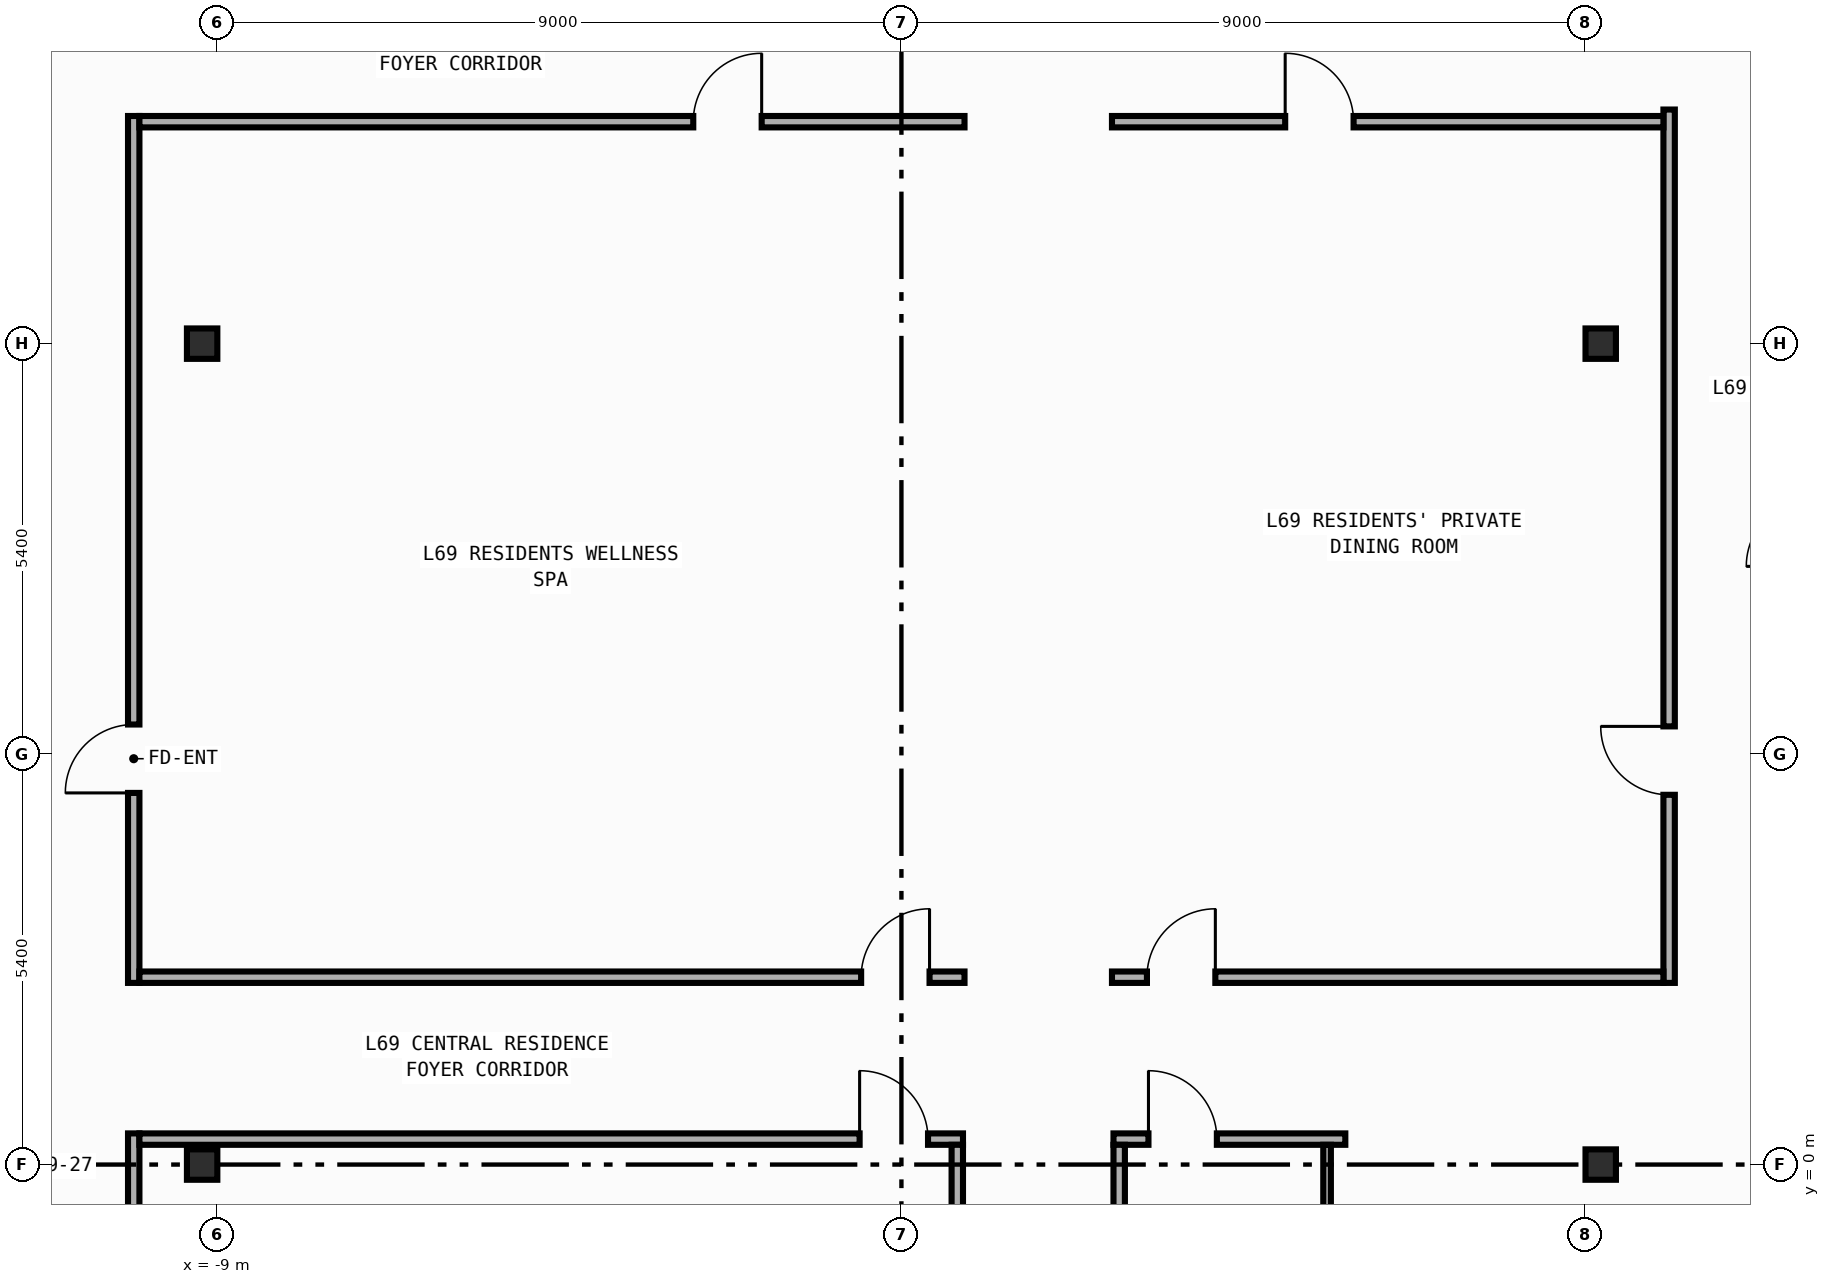
"""IFC4 building model, lengths in metres.
Left out: names, types, materials, properties, quantities, classifications, styles, units other than length and angle.
Written with IfcOpenShell. Run it as: python <this file> out.ifc"""

import sys

from ifc_helpers import new_model, si_unit, direction, frame, frame_2d, origin, origin_2d, place, context, subcontext, project, spatial, rectangle, i_section, extrude, element, fill, save


model = new_model("IFC4")
c1 = context("Model", 3, precision=1e-05, world=origin(), true_north=direction((0.0, 1.0)))
c2 = subcontext(c1, "Body", "Model", "MODEL_VIEW")
j1 = project(units=[si_unit("LENGTHUNIT", "METRE"), si_unit("PLANEANGLEUNIT", "RADIAN")], contexts=[c1])
p1 = place(None, origin())
s1 = spatial("IfcSite", under=j1, at=p1, CompositionType="ELEMENT")
p2 = place(p1, origin())
s2 = spatial("IfcBuilding", under=s1, at=p2, CompositionType="ELEMENT")
p3 = place(p2, frame((0.0, 0.0, 289.0)))
s3 = spatial("IfcBuildingStorey", under=s2, at=p3, CompositionType="ELEMENT", Elevation=289.0)
for number, where, z_axis, x_axis in (
    (1, (-9.2, 0.0, 0.0), (0.0, 0.0, 1.0), (1.0, 0.0, 0.0)),
    (2, (-9.2, 10.8, 0.0), (0.0, 0.0, 1.0), (1.0, 0.0, 0.0)),
    (3, (9.2, 0.0, 0.0), (0.0, 0.0, 1.0), (1.0, 0.0, 0.0)),
    (4, (9.2, 10.8, 0.0), (0.0, 0.0, 1.0), (1.0, 0.0, 0.0)),
):
    element("IfcColumn", number, at=place(p3, frame(where, z_axis=z_axis, x_axis=x_axis)), inside=s3, PredefinedType="COLUMN", context=c2, shape_type="SweptSolid", body=[
        extrude(i_section(OverallWidth=0.4, OverallDepth=0.4, WebThickness=0.013, FlangeThickness=0.021, FilletRadius=0.022, at=origin_2d()), origin(), (0.0, 0.0, 1.0), 3.8),
    ])
p4 = place(p3, frame((-10.1, 2.39, 0.0), z_axis=(0.0, 0.0, 1.0), x_axis=(0.0, 1.0, 0.0)))
e5 = element("IfcWall", 5, at=p4, inside=s3, PredefinedType="PARTITIONING", context=c2, shape_type="SweptSolid", body=[
    extrude(rectangle(XDim=11.405, YDim=0.15, at=frame_2d((5.703, 0.0))), origin(), (0.0, 0.0, 1.0), 3.54),
])
p5 = place(p4, frame((2.5, 0.0, 0.0)))
e6 = element("IfcOpeningElement", 6, at=p5, cuts=e5, PredefinedType="OPENING", context=c2, shape_type="SweptSolid", body=[
    extrude(rectangle(XDim=0.9, YDim=2.15, at=frame_2d((0.45, 1.075))), frame((0.0, 0.085, 0.0), z_axis=(0.0, -1.0, 0.0), x_axis=(1.0, 0.0, 0.0)), (0.0, 0.0, 1.0), 0.17),
])
p6 = place(p3, frame((-10.1, -13.795, 0.0), z_axis=(0.0, 0.0, 1.0), x_axis=(0.0, 1.0, 0.0)))
e7 = element("IfcWall", 7, at=p6, inside=s3, PredefinedType="PARTITIONING", context=c2, shape_type="SweptSolid", body=[
    extrude(rectangle(XDim=14.205, YDim=0.15, at=frame_2d((7.103, 0.0))), origin(), (0.0, 0.0, 1.0), 3.54),
])
p7 = place(p6, frame((7.972, 0.0, 0.0)))
e8 = element("IfcOpeningElement", 8, at=p7, cuts=e7, PredefinedType="OPENING", context=c2, shape_type="SweptSolid", body=[
    extrude(rectangle(XDim=0.9, YDim=2.15, at=frame_2d((0.45, 1.075))), frame((0.0, 0.085, 0.0), z_axis=(0.0, -1.0, 0.0), x_axis=(1.0, 0.0, 0.0)), (0.0, 0.0, 1.0), 0.17),
])
p8 = place(p3, frame((10.1, 2.39, 0.0), z_axis=(0.0, 0.0, 1.0), x_axis=(0.0, 1.0, 0.0)))
e9 = element("IfcWall", 9, at=p8, inside=s3, PredefinedType="PARTITIONING", context=c2, shape_type="SweptSolid", body=[
    extrude(rectangle(XDim=11.49, YDim=0.15, at=frame_2d((5.745, 0.0))), origin(), (0.0, 0.0, 1.0), 3.54),
])
p9 = place(p8, frame((2.475, 0.0, 0.0)))
e10 = element("IfcOpeningElement", 10, at=p9, cuts=e9, PredefinedType="OPENING", context=c2, shape_type="SweptSolid", body=[
    extrude(rectangle(XDim=0.9, YDim=2.15, at=frame_2d((0.45, 1.075))), frame((0.0, 0.085, 0.0), z_axis=(0.0, -1.0, 0.0), x_axis=(1.0, 0.0, 0.0)), (0.0, 0.0, 1.0), 0.17),
])
p10 = place(p3, frame((-10.025, 2.465, 0.0), z_axis=(0.0, 0.0, 1.0), x_axis=(1.0, 0.0, 0.0)))
e11 = element("IfcWall", 11, at=p10, inside=s3, PredefinedType="PARTITIONING", context=c2, shape_type="SweptSolid", body=[
    extrude(rectangle(XDim=10.855, YDim=0.15, at=frame_2d((5.427, 0.0))), origin(), (0.0, 0.0, 1.0), 3.54),
])
p11 = place(p10, frame((9.495, 0.0, 0.0)))
e12 = element("IfcOpeningElement", 12, at=p11, cuts=e11, PredefinedType="OPENING", context=c2, shape_type="SweptSolid", body=[
    extrude(rectangle(XDim=0.9, YDim=2.15, at=frame_2d((0.45, 1.075))), frame((0.0, 0.085, 0.0), z_axis=(0.0, -1.0, 0.0), x_axis=(1.0, 0.0, 0.0)), (0.0, 0.0, 1.0), 0.17),
])
p12 = place(p3, frame((-10.025, 0.335, 0.0), z_axis=(0.0, 0.0, 1.0), x_axis=(1.0, 0.0, 0.0)))
e13 = element("IfcWall", 13, at=p12, inside=s3, PredefinedType="PARTITIONING", context=c2, shape_type="SweptSolid", body=[
    extrude(rectangle(XDim=10.835, YDim=0.15, at=frame_2d((5.417, 0.0))), origin(), (0.0, 0.0, 1.0), 2.64),
])
p13 = place(p12, frame((9.475, 0.0, 0.0)))
e14 = element("IfcOpeningElement", 14, at=p13, cuts=e13, PredefinedType="OPENING", context=c2, shape_type="SweptSolid", body=[
    extrude(rectangle(XDim=0.9, YDim=2.15, at=frame_2d((0.45, 1.075))), frame((0.0, 0.085, 0.0), z_axis=(0.0, -1.0, 0.0), x_axis=(1.0, 0.0, 0.0)), (0.0, 0.0, 1.0), 0.17),
])
p14 = place(p3, frame((2.77, 2.465, 0.0), z_axis=(0.0, 0.0, 1.0), x_axis=(1.0, 0.0, 0.0)))
e15 = element("IfcWall", 15, at=p14, inside=s3, PredefinedType="PARTITIONING", context=c2, shape_type="SweptSolid", body=[
    extrude(rectangle(XDim=7.255, YDim=0.15, at=frame_2d((3.627, 0.0))), origin(), (0.0, 0.0, 1.0), 3.54),
])
p15 = place(p14, frame((0.46, 0.0, 0.0)))
e16 = element("IfcOpeningElement", 16, at=p15, cuts=e15, PredefinedType="OPENING", context=c2, shape_type="SweptSolid", body=[
    extrude(rectangle(XDim=0.9, YDim=2.15, at=frame_2d((0.45, 1.075))), frame((0.0, 0.085, 0.0), z_axis=(0.0, -1.0, 0.0), x_axis=(1.0, 0.0, 0.0)), (0.0, 0.0, 1.0), 0.17),
])
p16 = place(p3, frame((2.79, 0.335, 0.0), z_axis=(0.0, 0.0, 1.0), x_axis=(1.0, 0.0, 0.0)))
e17 = element("IfcWall", 17, at=p16, inside=s3, PredefinedType="PARTITIONING", context=c2, shape_type="SweptSolid", body=[
    extrude(rectangle(XDim=3.05, YDim=0.15, at=frame_2d((1.525, 0.0))), origin(), (0.0, 0.0, 1.0), 2.64),
])
p17 = place(p16, frame((0.46, 0.0, 0.0)))
e18 = element("IfcOpeningElement", 18, at=p17, cuts=e17, PredefinedType="OPENING", context=c2, shape_type="SweptSolid", body=[
    extrude(rectangle(XDim=0.9, YDim=2.15, at=frame_2d((0.45, 1.075))), frame((0.0, 0.085, 0.0), z_axis=(0.0, -1.0, 0.0), x_axis=(1.0, 0.0, 0.0)), (0.0, 0.0, 1.0), 0.17),
])
p18 = place(p3, frame((0.735, -13.795, 0.0), z_axis=(0.0, 0.0, 1.0), x_axis=(0.0, 1.0, 0.0)))
e19 = element("IfcWall", 19, at=p18, inside=s3, PredefinedType="PARTITIONING", context=c2, shape_type="SweptSolid", body=[
    extrude(rectangle(XDim=14.055, YDim=0.15, at=frame_2d((7.027, 0.0))), origin(), (0.0, 0.0, 1.0), 3.54),
])
p19 = place(p18, frame((7.881, 0.0, 0.0)))
e20 = element("IfcOpeningElement", 20, at=p19, cuts=e19, PredefinedType="OPENING", context=c2, shape_type="SweptSolid", body=[
    extrude(rectangle(XDim=0.9, YDim=2.15, at=frame_2d((0.45, 1.075))), frame((0.0, 0.085, 0.0), z_axis=(0.0, -1.0, 0.0), x_axis=(1.0, 0.0, 0.0)), (0.0, 0.0, 1.0), 0.17),
])
p20 = place(p3, frame((2.865, -2.38, 0.0), z_axis=(0.0, 0.0, 1.0), x_axis=(0.0, 1.0, 0.0)))
e21 = element("IfcWall", 21, at=p20, inside=s3, PredefinedType="PARTITIONING", context=c2, shape_type="SweptSolid", body=[
    extrude(rectangle(XDim=2.64, YDim=0.15, at=frame_2d((1.32, 0.0))), origin(), (0.0, 0.0, 1.0), 3.54),
])
p21 = place(p20, frame((0.46, 0.0, 0.0)))
e22 = element("IfcOpeningElement", 22, at=p21, cuts=e21, PredefinedType="OPENING", context=c2, shape_type="SweptSolid", body=[
    extrude(rectangle(XDim=0.9, YDim=2.15, at=frame_2d((0.45, 1.075))), frame((0.0, 0.085, 0.0), z_axis=(0.0, -1.0, 0.0), x_axis=(1.0, 0.0, 0.0)), (0.0, 0.0, 1.0), 0.17),
])
p22 = place(p3, frame((-10.025, 13.72, 0.0), z_axis=(0.0, 0.0, 1.0), x_axis=(1.0, 0.0, 0.0)))
e23 = element("IfcWall", 23, at=p22, inside=s3, PredefinedType="PARTITIONING", context=c2, shape_type="SweptSolid", body=[
    extrude(rectangle(XDim=10.855, YDim=0.15, at=frame_2d((5.427, 0.0))), origin(), (0.0, 0.0, 1.0), 3.54),
])
p23 = place(p22, frame((7.286, 0.0, 0.0)))
e24 = element("IfcOpeningElement", 24, at=p23, cuts=e23, PredefinedType="OPENING", context=c2, shape_type="SweptSolid", body=[
    extrude(rectangle(XDim=0.9, YDim=2.15, at=frame_2d((0.45, 1.075))), frame((0.0, 0.085, 0.0), z_axis=(0.0, -1.0, 0.0), x_axis=(1.0, 0.0, 0.0)), (0.0, 0.0, 1.0), 0.17),
])
p24 = place(p3, frame((2.77, 13.72, 0.0), z_axis=(0.0, 0.0, 1.0), x_axis=(1.0, 0.0, 0.0)))
e25 = element("IfcWall", 25, at=p24, inside=s3, PredefinedType="PARTITIONING", context=c2, shape_type="SweptSolid", body=[
    extrude(rectangle(XDim=7.255, YDim=0.15, at=frame_2d((3.627, 0.0))), origin(), (0.0, 0.0, 1.0), 3.54),
])
p25 = place(p24, frame((2.279, 0.0, 0.0)))
e26 = element("IfcOpeningElement", 26, at=p25, cuts=e25, PredefinedType="OPENING", context=c2, shape_type="SweptSolid", body=[
    extrude(rectangle(XDim=0.9, YDim=2.15, at=frame_2d((0.45, 1.075))), frame((0.0, 0.085, 0.0), z_axis=(0.0, -1.0, 0.0), x_axis=(1.0, 0.0, 0.0)), (0.0, 0.0, 1.0), 0.17),
])
p26 = place(p3, frame((5.6, 0.26, 0.0), z_axis=(0.0, 0.0, 1.0), x_axis=(0.0, -1.0, 0.0)))
e27 = element("IfcWall", 27, at=p26, inside=s3, PredefinedType="PARTITIONING", context=c2, shape_type="SweptSolid", body=[
    extrude(rectangle(XDim=2.57, YDim=0.1, at=frame_2d((1.285, 0.0))), origin(), (0.0, 0.0, 1.0), 3.54),
])
p27 = place(p5, origin())
e28 = element("IfcDoor", 28, at=p27, inside=s3, OperationType="SINGLE_SWING_LEFT", PredefinedType="DOOR", context=c2, shape_type="SweptSolid", body=[
    extrude(rectangle(XDim=0.9, YDim=2.15, at=frame_2d((0.45, 1.075))), frame((0.0, 0.025, 0.0), z_axis=(0.0, -1.0, 0.0), x_axis=(1.0, 0.0, 0.0)), (0.0, 0.0, 1.0), 0.05),
])
fill(e6, e28)
p28 = place(p9, origin())
e29 = element("IfcDoor", 29, at=p28, inside=s3, OperationType="SINGLE_SWING_RIGHT", PredefinedType="DOOR", context=c2, shape_type="SweptSolid", body=[
    extrude(rectangle(XDim=0.9, YDim=2.15, at=frame_2d((0.45, 1.075))), frame((0.0, 0.025, 0.0), z_axis=(0.0, -1.0, 0.0), x_axis=(1.0, 0.0, 0.0)), (0.0, 0.0, 1.0), 0.05),
])
fill(e10, e29)
p29 = place(p11, origin())
e30 = element("IfcDoor", 30, at=p29, inside=s3, OperationType="SINGLE_SWING_RIGHT", PredefinedType="DOOR", context=c2, shape_type="SweptSolid", body=[
    extrude(rectangle(XDim=0.9, YDim=2.15, at=frame_2d((0.45, 1.075))), frame((0.0, 0.025, 0.0), z_axis=(0.0, -1.0, 0.0), x_axis=(1.0, 0.0, 0.0)), (0.0, 0.0, 1.0), 0.05),
])
fill(e12, e30)
p30 = place(p13, origin())
e31 = element("IfcDoor", 31, at=p30, inside=s3, OperationType="SINGLE_SWING_LEFT", PredefinedType="DOOR", context=c2, shape_type="SweptSolid", body=[
    extrude(rectangle(XDim=0.9, YDim=2.15, at=frame_2d((0.45, 1.075))), frame((0.0, 0.025, 0.0), z_axis=(0.0, -1.0, 0.0), x_axis=(1.0, 0.0, 0.0)), (0.0, 0.0, 1.0), 0.05),
])
fill(e14, e31)
p31 = place(p15, origin())
e32 = element("IfcDoor", 32, at=p31, inside=s3, OperationType="SINGLE_SWING_RIGHT", PredefinedType="DOOR", context=c2, shape_type="SweptSolid", body=[
    extrude(rectangle(XDim=0.9, YDim=2.15, at=frame_2d((0.45, 1.075))), frame((0.0, 0.025, 0.0), z_axis=(0.0, -1.0, 0.0), x_axis=(1.0, 0.0, 0.0)), (0.0, 0.0, 1.0), 0.05),
])
fill(e16, e32)
p32 = place(p17, origin())
e33 = element("IfcDoor", 33, at=p32, inside=s3, OperationType="SINGLE_SWING_LEFT", PredefinedType="DOOR", context=c2, shape_type="SweptSolid", body=[
    extrude(rectangle(XDim=0.9, YDim=2.15, at=frame_2d((0.45, 1.075))), frame((0.0, 0.025, 0.0), z_axis=(0.0, -1.0, 0.0), x_axis=(1.0, 0.0, 0.0)), (0.0, 0.0, 1.0), 0.05),
])
fill(e18, e33)
p33 = place(p23, origin())
e34 = element("IfcDoor", 34, at=p33, inside=s3, OperationType="SINGLE_SWING_RIGHT", PredefinedType="DOOR", context=c2, shape_type="SweptSolid", body=[
    extrude(rectangle(XDim=0.9, YDim=2.15, at=frame_2d((0.45, 1.075))), frame((0.0, 0.025, 0.0), z_axis=(0.0, -1.0, 0.0), x_axis=(1.0, 0.0, 0.0)), (0.0, 0.0, 1.0), 0.05),
])
fill(e24, e34)
p34 = place(p25, origin())
e35 = element("IfcDoor", 35, at=p34, inside=s3, OperationType="SINGLE_SWING_LEFT", PredefinedType="DOOR", context=c2, shape_type="SweptSolid", body=[
    extrude(rectangle(XDim=0.9, YDim=2.15, at=frame_2d((0.45, 1.075))), frame((0.0, 0.025, 0.0), z_axis=(0.0, -1.0, 0.0), x_axis=(1.0, 0.0, 0.0)), (0.0, 0.0, 1.0), 0.05),
])
fill(e26, e35)
save(model, sys.argv[1])
